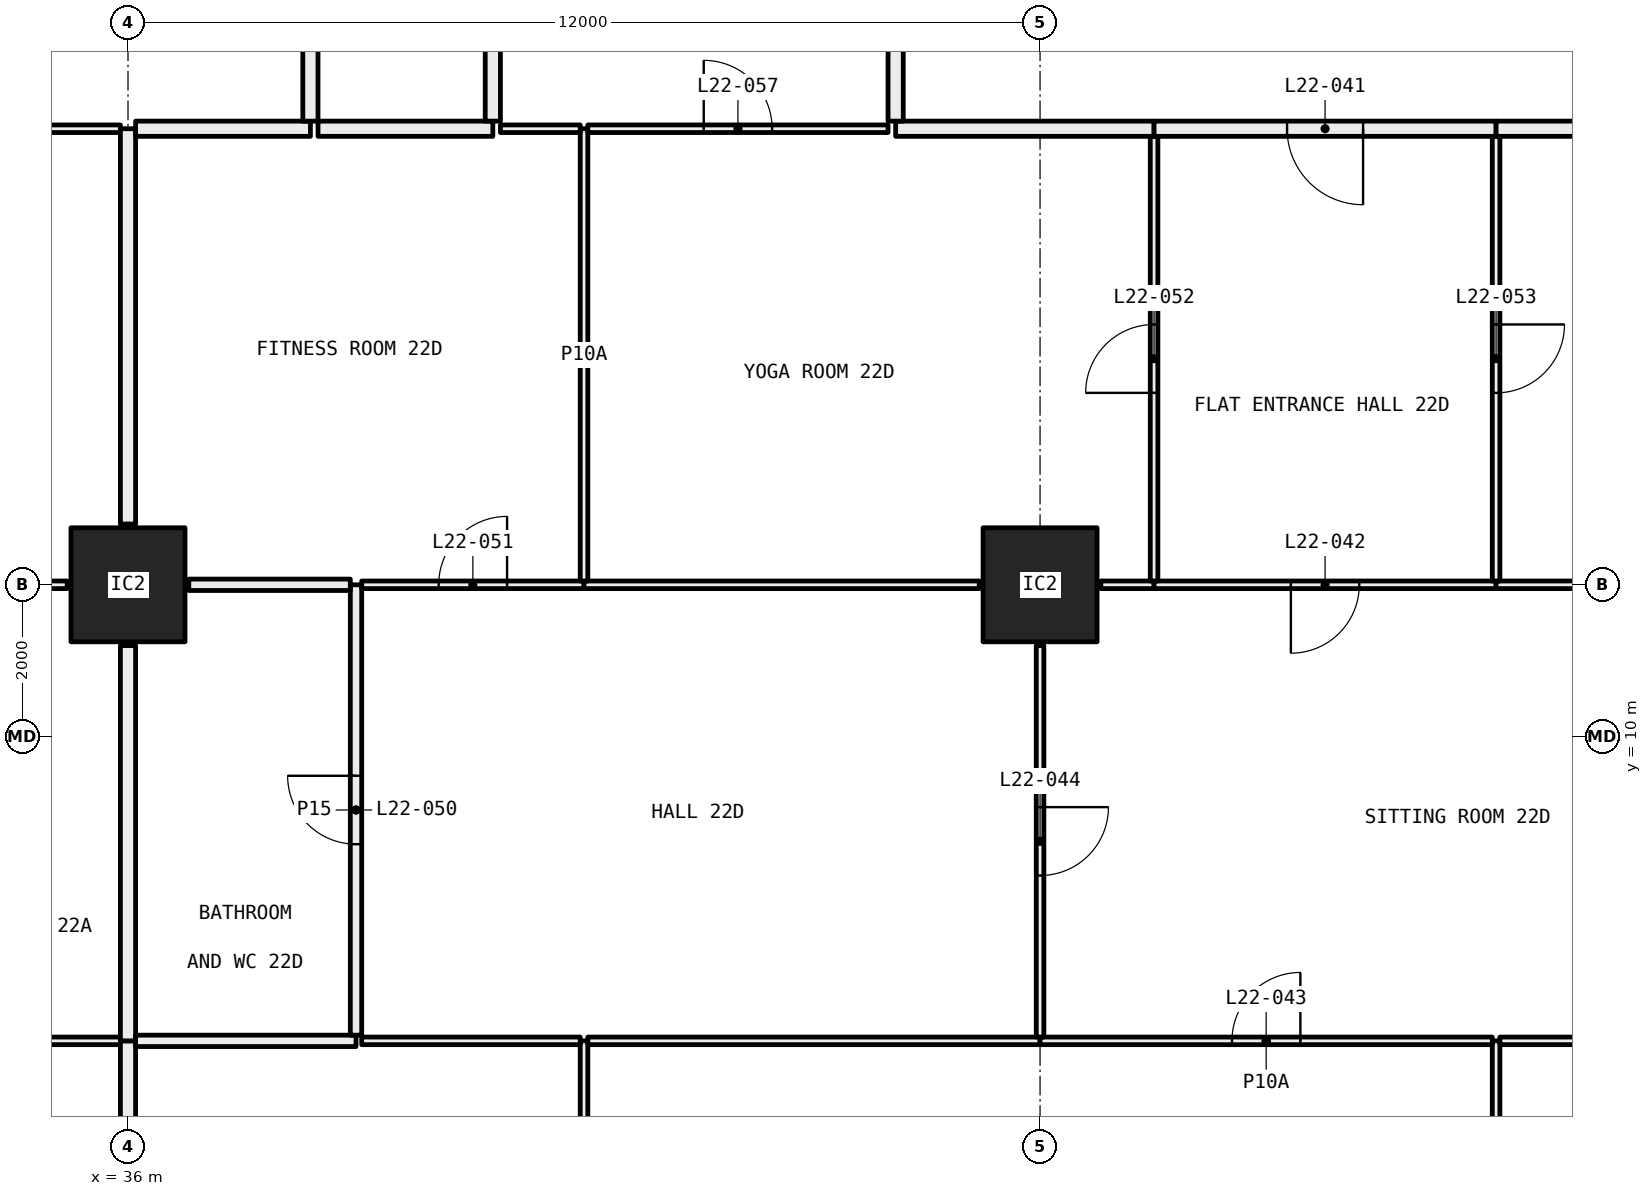
"""IFC4 building model, lengths in metres.
Left out: names, types, materials, properties, quantities, classifications, styles, units other than length and angle.
Written with IfcOpenShell. Run it as: python <this file> out.ifc"""

import sys

from ifc_helpers import new_model, si_unit, direction, frame, frame_2d, origin, origin_2d, place, context, subcontext, project, spatial, rectangle, hollow_rectangle, extrude, element, fill, save


model = new_model("IFC4")
c1 = context("Model", 3, precision=1e-05, world=origin(), true_north=direction((0.0, 1.0)))
c2 = subcontext(c1, "Body", "Model", "MODEL_VIEW")
j1 = project(units=[si_unit("LENGTHUNIT", "METRE"), si_unit("PLANEANGLEUNIT", "RADIAN")], contexts=[c1])
p1 = place(None, origin())
s1 = spatial("IfcSite", under=j1, at=p1, CompositionType="ELEMENT")
p2 = place(p1, origin())
s2 = spatial("IfcBuilding", under=s1, at=p2, CompositionType="ELEMENT")
p3 = place(p2, frame((0.0, 0.0, 88.65)))
s3 = spatial("IfcBuildingStorey", under=s2, at=p3, CompositionType="ELEMENT", Elevation=88.65)
for number, where, z_axis, x_axis in (
    (1, (36.0, 12.0, 0.0), (0.0, 0.0, 1.0), (1.0, 0.0, 0.0)),
    (2, (48.0, 12.0, 0.0), (0.0, 0.0, 1.0), (1.0, 0.0, 0.0)),
):
    element("IfcColumn", number, at=place(p3, frame(where, z_axis=z_axis, x_axis=x_axis)), inside=s3, PredefinedType="COLUMN", context=c2, shape_type="SweptSolid", body=[
        extrude(hollow_rectangle(XDim=1.5, YDim=1.5, WallThickness=0.065, at=origin_2d()), origin(), (0.0, 0.0, 1.0), 3.05),
    ])
p4 = place(p3, frame((35.9, 6.0, 0.0), z_axis=(0.0, 0.0, 1.0), x_axis=(-1.0, 0.0, 0.0)))
e3 = element("IfcWall", 3, at=p4, inside=s3, PredefinedType="PARTITIONING", context=c2, shape_type="SweptSolid", body=[
    extrude(rectangle(XDim=2.9, YDim=0.1, at=frame_2d((1.45, 0.0))), origin(), (0.0, 0.0, 1.0), 3.05),
])
p5 = place(p3, frame((36.0, 0.72, 0.0), z_axis=(0.0, 0.0, 1.0), x_axis=(0.0, 1.0, 0.0)))
e4 = element("IfcWall", 4, at=p5, inside=s3, PredefinedType="PARTITIONING", context=c2, shape_type="SweptSolid", body=[
    extrude(rectangle(XDim=5.28, YDim=0.2, at=frame_2d((2.64, 0.0))), origin(), (0.0, 0.0, 1.0), 2.45),
])
p6 = place(p3, frame((35.2, 12.0, 0.0), z_axis=(0.0, 0.0, 1.0), x_axis=(-1.0, 0.0, 0.0)))
e5 = element("IfcWall", 5, at=p6, inside=s3, PredefinedType="PARTITIONING", context=c2, shape_type="SweptSolid", body=[
    extrude(rectangle(XDim=2.15, YDim=0.1, at=frame_2d((1.075, 0.0))), origin(), (0.0, 0.0, 1.0), 2.45),
])
p7 = place(p3, frame((36.0, 6.0, 0.0), z_axis=(0.0, 0.0, 1.0), x_axis=(0.0, 1.0, 0.0)))
e6 = element("IfcWall", 6, at=p7, inside=s3, PredefinedType="PARTITIONING", context=c2, shape_type="SweptSolid", body=[
    extrude(rectangle(XDim=5.2, YDim=0.2, at=frame_2d((2.6, 0.0))), origin(), (0.0, 0.0, 1.0), 2.45),
])
p8 = place(p3, frame((35.9, 18.0, 0.0), z_axis=(0.0, 0.0, 1.0), x_axis=(-1.0, 0.0, 0.0)))
e7 = element("IfcWall", 7, at=p8, inside=s3, PredefinedType="PARTITIONING", context=c2, shape_type="SweptSolid", body=[
    extrude(rectangle(XDim=1.4, YDim=0.1, at=frame_2d((0.7, 0.0))), origin(), (0.0, 0.0, 1.0), 3.05),
])
p9 = place(p3, frame((36.0, 12.8, 0.0), z_axis=(0.0, 0.0, 1.0), x_axis=(0.0, 1.0, 0.0)))
e8 = element("IfcWall", 8, at=p9, inside=s3, PredefinedType="PARTITIONING", context=c2, shape_type="SweptSolid", body=[
    extrude(rectangle(XDim=5.2, YDim=0.2, at=frame_2d((2.6, 0.0))), origin(), (0.0, 0.0, 1.0), 2.45),
])
p10 = place(p3, frame((36.1, 18.0, 0.0), z_axis=(0.0, 0.0, 1.0), x_axis=(1.0, 0.0, 0.0)))
e9 = element("IfcWall", 9, at=p10, inside=s3, PredefinedType="PARTITIONING", context=c2, shape_type="SweptSolid", body=[
    extrude(rectangle(XDim=2.3, YDim=0.2, at=frame_2d((1.15, 0.0))), origin(), (0.0, 0.0, 1.0), 3.05),
])
p11 = place(p3, frame((38.4, 18.1, 0.0), z_axis=(0.0, 0.0, 1.0), x_axis=(0.0, 1.0, 0.0)))
e10 = element("IfcWall", 10, at=p11, inside=s3, PredefinedType="PARTITIONING", context=c2, shape_type="SweptSolid", body=[
    extrude(rectangle(XDim=6.2, YDim=0.2, at=frame_2d((3.1, 0.0))), origin(), (0.0, 0.0, 1.0), 2.45),
])
p12 = place(p3, frame((42.0, 0.72, 0.0), z_axis=(0.0, 0.0, 1.0), x_axis=(0.0, 1.0, 0.0)))
e11 = element("IfcWall", 11, at=p12, inside=s3, PredefinedType="PARTITIONING", context=c2, shape_type="SweptSolid", body=[
    extrude(rectangle(XDim=5.28, YDim=0.1, at=frame_2d((2.64, 0.0))), origin(), (0.0, 0.0, 1.0), 3.05),
])
p13 = place(p12, frame((2.19, 0.0, 0.0)))
e12 = element("IfcOpeningElement", 12, at=p13, cuts=e11, PredefinedType="OPENING", context=c2, shape_type="SweptSolid", body=[
    extrude(rectangle(XDim=0.9, YDim=2.1, at=frame_2d((0.45, 1.05))), frame((0.0, 0.06, 0.0), z_axis=(0.0, -1.0, 0.0), x_axis=(1.0, 0.0, 0.0)), (0.0, 0.0, 1.0), 0.12),
])
p14 = place(p3, frame((39.0, 6.0, 0.0), z_axis=(0.0, 0.0, 1.0), x_axis=(-1.0, 0.0, 0.0)))
e13 = element("IfcWall", 13, at=p14, inside=s3, PredefinedType="PARTITIONING", context=c2, shape_type="SweptSolid", body=[
    extrude(rectangle(XDim=2.9, YDim=0.15, at=frame_2d((1.45, 0.0))), origin(), (0.0, 0.0, 1.0), 3.05),
])
p15 = place(p3, frame((41.95, 6.0, 0.0), z_axis=(0.0, 0.0, 1.0), x_axis=(-1.0, 0.0, 0.0)))
e14 = element("IfcWall", 14, at=p15, inside=s3, PredefinedType="PARTITIONING", context=c2, shape_type="SweptSolid", body=[
    extrude(rectangle(XDim=2.875, YDim=0.1, at=frame_2d((1.438, 0.0))), origin(), (0.0, 0.0, 1.0), 3.05),
])
p16 = place(p3, frame((54.0, 0.72, 0.0), z_axis=(0.0, 0.0, 1.0), x_axis=(0.0, 1.0, 0.0)))
e15 = element("IfcWall", 15, at=p16, inside=s3, PredefinedType="PARTITIONING", context=c2, shape_type="SweptSolid", body=[
    extrude(rectangle(XDim=5.28, YDim=0.1, at=frame_2d((2.64, 0.0))), origin(), (0.0, 0.0, 1.0), 3.05),
])
p17 = place(p16, frame((2.19, 0.0, 0.0)))
e16 = element("IfcOpeningElement", 16, at=p17, cuts=e15, PredefinedType="OPENING", context=c2, shape_type="SweptSolid", body=[
    extrude(rectangle(XDim=0.9, YDim=2.1, at=frame_2d((0.45, 1.05))), frame((0.0, 0.06, 0.0), z_axis=(0.0, -1.0, 0.0), x_axis=(1.0, 0.0, 0.0)), (0.0, 0.0, 1.0), 0.12),
])
p18 = place(p3, frame((48.0, 6.0, 0.0), z_axis=(0.0, 0.0, 1.0), x_axis=(-1.0, 0.0, 0.0)))
e17 = element("IfcWall", 17, at=p18, inside=s3, PredefinedType="PARTITIONING", context=c2, shape_type="SweptSolid", body=[
    extrude(rectangle(XDim=5.95, YDim=0.1, at=frame_2d((2.975, 0.0))), origin(), (0.0, 0.0, 1.0), 2.45),
])
p19 = place(p3, frame((53.95, 6.0, 0.0), z_axis=(0.0, 0.0, 1.0), x_axis=(-1.0, 0.0, 0.0)))
e18 = element("IfcWall", 18, at=p19, inside=s3, PredefinedType="PARTITIONING", context=c2, shape_type="SweptSolid", body=[
    extrude(rectangle(XDim=5.95, YDim=0.1, at=frame_2d((2.975, 0.0))), origin(), (0.0, 0.0, 1.0), 2.45),
])
p20 = place(p19, frame((2.525, 0.0, 0.0)))
e19 = element("IfcOpeningElement", 19, at=p20, cuts=e18, PredefinedType="OPENING", context=c2, shape_type="SweptSolid", body=[
    extrude(rectangle(XDim=0.9, YDim=2.1, at=frame_2d((0.45, 1.05))), frame((0.0, 0.06, 0.0), z_axis=(0.0, -1.0, 0.0), x_axis=(1.0, 0.0, 0.0)), (0.0, 0.0, 1.0), 0.12),
])
p21 = place(p3, frame((57.0, 6.0, 0.0), z_axis=(0.0, 0.0, 1.0), x_axis=(-1.0, 0.0, 0.0)))
e20 = element("IfcWall", 20, at=p21, inside=s3, PredefinedType="PARTITIONING", context=c2, shape_type="SweptSolid", body=[
    extrude(rectangle(XDim=2.95, YDim=0.1, at=frame_2d((1.475, 0.0))), origin(), (0.0, 0.0, 1.0), 3.05),
])
p22 = place(p3, frame((39.0, 6.075, 0.0), z_axis=(0.0, 0.0, 1.0), x_axis=(0.0, 1.0, 0.0)))
e21 = element("IfcWall", 21, at=p22, inside=s3, PredefinedType="PARTITIONING", context=c2, shape_type="SweptSolid", body=[
    extrude(rectangle(XDim=5.925, YDim=0.15, at=frame_2d((2.962, 0.0))), origin(), (0.0, 0.0, 1.0), 2.45),
])
p23 = place(p22, frame((2.512, 0.0, 0.0)))
e22 = element("IfcOpeningElement", 22, at=p23, cuts=e21, PredefinedType="OPENING", context=c2, shape_type="SweptSolid", body=[
    extrude(rectangle(XDim=0.9, YDim=2.1, at=frame_2d((0.45, 1.05))), frame((0.0, 0.085, 0.0), z_axis=(0.0, -1.0, 0.0), x_axis=(1.0, 0.0, 0.0)), (0.0, 0.0, 1.0), 0.17),
])
p24 = place(p3, frame((38.925, 12.0, 0.0), z_axis=(0.0, 0.0, 1.0), x_axis=(-1.0, 0.0, 0.0)))
e23 = element("IfcWall", 23, at=p24, inside=s3, PredefinedType="PARTITIONING", context=c2, shape_type="SweptSolid", body=[
    extrude(rectangle(XDim=2.125, YDim=0.15, at=frame_2d((1.062, 0.0))), origin(), (0.0, 0.0, 1.0), 2.45),
])
p25 = place(p3, frame((48.0, 6.05, 0.0), z_axis=(0.0, 0.0, 1.0), x_axis=(0.0, 1.0, 0.0)))
e24 = element("IfcWall", 24, at=p25, inside=s3, PredefinedType="PARTITIONING", context=c2, shape_type="SweptSolid", body=[
    extrude(rectangle(XDim=5.15, YDim=0.1, at=frame_2d((2.575, 0.0))), origin(), (0.0, 0.0, 1.0), 2.45),
])
p26 = place(p25, frame((2.125, 0.0, 0.0)))
e25 = element("IfcOpeningElement", 25, at=p26, cuts=e24, PredefinedType="OPENING", context=c2, shape_type="SweptSolid", body=[
    extrude(rectangle(XDim=0.9, YDim=2.1, at=frame_2d((0.45, 1.05))), frame((0.0, 0.06, 0.0), z_axis=(0.0, -1.0, 0.0), x_axis=(1.0, 0.0, 0.0)), (0.0, 0.0, 1.0), 0.12),
])
p27 = place(p3, frame((42.0, 12.0, 0.0), z_axis=(0.0, 0.0, 1.0), x_axis=(-1.0, 0.0, 0.0)))
e26 = element("IfcWall", 26, at=p27, inside=s3, PredefinedType="PARTITIONING", context=c2, shape_type="SweptSolid", body=[
    extrude(rectangle(XDim=2.925, YDim=0.1, at=frame_2d((1.462, 0.0))), origin(), (0.0, 0.0, 1.0), 2.45),
])
p28 = place(p27, frame((1.012, 0.0, 0.0)))
e27 = element("IfcOpeningElement", 27, at=p28, cuts=e26, PredefinedType="OPENING", context=c2, shape_type="SweptSolid", body=[
    extrude(rectangle(XDim=0.9, YDim=2.1, at=frame_2d((0.45, 1.05))), frame((0.0, 0.06, 0.0), z_axis=(0.0, -1.0, 0.0), x_axis=(1.0, 0.0, 0.0)), (0.0, 0.0, 1.0), 0.12),
])
p29 = place(p3, frame((47.2, 12.0, 0.0), z_axis=(0.0, 0.0, 1.0), x_axis=(-1.0, 0.0, 0.0)))
e28 = element("IfcWall", 28, at=p29, inside=s3, PredefinedType="PARTITIONING", context=c2, shape_type="SweptSolid", body=[
    extrude(rectangle(XDim=5.2, YDim=0.1, at=frame_2d((2.6, 0.0))), origin(), (0.0, 0.0, 1.0), 2.45),
])
p30 = place(p3, frame((49.5, 12.0, 0.0), z_axis=(0.0, 0.0, 1.0), x_axis=(-1.0, 0.0, 0.0)))
e29 = element("IfcWall", 29, at=p30, inside=s3, PredefinedType="PARTITIONING", context=c2, shape_type="SweptSolid", body=[
    extrude(rectangle(XDim=0.7, YDim=0.1, at=frame_2d((0.35, 0.0))), origin(), (0.0, 0.0, 1.0), 2.45),
])
p31 = place(p3, frame((54.0, 12.0, 0.0), z_axis=(0.0, 0.0, 1.0), x_axis=(-1.0, 0.0, 0.0)))
e30 = element("IfcWall", 30, at=p31, inside=s3, PredefinedType="PARTITIONING", context=c2, shape_type="SweptSolid", body=[
    extrude(rectangle(XDim=4.5, YDim=0.1, at=frame_2d((2.25, 0.0))), origin(), (0.0, 0.0, 1.0), 2.45),
])
p32 = place(p31, frame((1.8, 0.0, 0.0)))
e31 = element("IfcOpeningElement", 31, at=p32, cuts=e30, PredefinedType="OPENING", context=c2, shape_type="SweptSolid", body=[
    extrude(rectangle(XDim=0.9, YDim=2.1, at=frame_2d((0.45, 1.05))), frame((0.0, 0.06, 0.0), z_axis=(0.0, -1.0, 0.0), x_axis=(1.0, 0.0, 0.0)), (0.0, 0.0, 1.0), 0.12),
])
p33 = place(p3, frame((56.95, 12.0, 0.0), z_axis=(0.0, 0.0, 1.0), x_axis=(-1.0, 0.0, 0.0)))
e32 = element("IfcWall", 32, at=p33, inside=s3, PredefinedType="PARTITIONING", context=c2, shape_type="SweptSolid", body=[
    extrude(rectangle(XDim=2.95, YDim=0.1, at=frame_2d((1.475, 0.0))), origin(), (0.0, 0.0, 1.0), 2.45),
])
p34 = place(p3, frame((42.0, 12.05, 0.0), z_axis=(0.0, 0.0, 1.0), x_axis=(0.0, 1.0, 0.0)))
e33 = element("IfcWall", 33, at=p34, inside=s3, PredefinedType="PARTITIONING", context=c2, shape_type="SweptSolid", body=[
    extrude(rectangle(XDim=5.95, YDim=0.1, at=frame_2d((2.975, 0.0))), origin(), (0.0, 0.0, 1.0), 2.45),
])
p35 = place(p3, frame((41.95, 18.0, 0.0), z_axis=(0.0, 0.0, 1.0), x_axis=(-1.0, 0.0, 0.0)))
e34 = element("IfcWall", 34, at=p35, inside=s3, PredefinedType="PARTITIONING", context=c2, shape_type="SweptSolid", body=[
    extrude(rectangle(XDim=1.05, YDim=0.1, at=frame_2d((0.525, 0.0))), origin(), (0.0, 0.0, 1.0), 3.05),
])
p36 = place(p3, frame((40.8, 18.0, 0.0), z_axis=(0.0, 0.0, 1.0), x_axis=(-1.0, 0.0, 0.0)))
e35 = element("IfcWall", 35, at=p36, inside=s3, PredefinedType="PARTITIONING", context=c2, shape_type="SweptSolid", body=[
    extrude(rectangle(XDim=2.3, YDim=0.2, at=frame_2d((1.15, 0.0))), origin(), (0.0, 0.0, 1.0), 3.05),
])
p37 = place(p3, frame((49.5, 12.05, 0.0), z_axis=(0.0, 0.0, 1.0), x_axis=(0.0, 1.0, 0.0)))
e36 = element("IfcWall", 36, at=p37, inside=s3, PredefinedType="PARTITIONING", context=c2, shape_type="SweptSolid", body=[
    extrude(rectangle(XDim=5.85, YDim=0.1, at=frame_2d((2.925, 0.0))), origin(), (0.0, 0.0, 1.0), 2.45),
])
p38 = place(p37, frame((2.475, 0.0, 0.0)))
e37 = element("IfcOpeningElement", 37, at=p38, cuts=e36, PredefinedType="OPENING", context=c2, shape_type="SweptSolid", body=[
    extrude(rectangle(XDim=0.9, YDim=2.1, at=frame_2d((0.45, 1.05))), frame((0.0, 0.06, 0.0), z_axis=(0.0, -1.0, 0.0), x_axis=(1.0, 0.0, 0.0)), (0.0, 0.0, 1.0), 0.12),
])
p39 = place(p3, frame((46.0, 18.0, 0.0), z_axis=(0.0, 0.0, 1.0), x_axis=(-1.0, 0.0, 0.0)))
e38 = element("IfcWall", 38, at=p39, inside=s3, PredefinedType="PARTITIONING", context=c2, shape_type="SweptSolid", body=[
    extrude(rectangle(XDim=3.95, YDim=0.1, at=frame_2d((1.975, 0.0))), origin(), (0.0, 0.0, 1.0), 3.05),
])
p40 = place(p39, frame((1.525, 0.0, 0.0)))
e39 = element("IfcOpeningElement", 39, at=p40, cuts=e38, PredefinedType="OPENING", context=c2, shape_type="SweptSolid", body=[
    extrude(rectangle(XDim=0.9, YDim=2.1, at=frame_2d((0.45, 1.05))), frame((0.0, 0.06, 0.0), z_axis=(0.0, -1.0, 0.0), x_axis=(1.0, 0.0, 0.0)), (0.0, 0.0, 1.0), 0.12),
])
p41 = place(p3, frame((49.5, 18.0, 0.0), z_axis=(0.0, 0.0, 1.0), x_axis=(-1.0, 0.0, 0.0)))
e40 = element("IfcWall", 40, at=p41, inside=s3, PredefinedType="PARTITIONING", context=c2, shape_type="SweptSolid", body=[
    extrude(rectangle(XDim=3.4, YDim=0.2, at=frame_2d((1.7, 0.0))), origin(), (0.0, 0.0, 1.0), 3.05),
])
p42 = place(p3, frame((54.0, 12.05, 0.0), z_axis=(0.0, 0.0, 1.0), x_axis=(0.0, 1.0, 0.0)))
e41 = element("IfcWall", 41, at=p42, inside=s3, PredefinedType="PARTITIONING", context=c2, shape_type="SweptSolid", body=[
    extrude(rectangle(XDim=5.85, YDim=0.1, at=frame_2d((2.925, 0.0))), origin(), (0.0, 0.0, 1.0), 2.45),
])
p43 = place(p42, frame((2.475, 0.0, 0.0)))
e42 = element("IfcOpeningElement", 42, at=p43, cuts=e41, PredefinedType="OPENING", context=c2, shape_type="SweptSolid", body=[
    extrude(rectangle(XDim=0.9, YDim=2.1, at=frame_2d((0.45, 1.05))), frame((0.0, 0.06, 0.0), z_axis=(0.0, -1.0, 0.0), x_axis=(1.0, 0.0, 0.0)), (0.0, 0.0, 1.0), 0.12),
])
p44 = place(p3, frame((54.0, 18.0, 0.0), z_axis=(0.0, 0.0, 1.0), x_axis=(-1.0, 0.0, 0.0)))
e43 = element("IfcWall", 43, at=p44, inside=s3, PredefinedType="PARTITIONING", context=c2, shape_type="SweptSolid", body=[
    extrude(rectangle(XDim=4.5, YDim=0.2, at=frame_2d((2.25, 0.0))), origin(), (0.0, 0.0, 1.0), 3.05),
])
p45 = place(p44, frame((1.75, 0.0, 0.0)))
e44 = element("IfcOpeningElement", 44, at=p45, cuts=e43, PredefinedType="OPENING", context=c2, shape_type="SweptSolid", body=[
    extrude(rectangle(XDim=1.0, YDim=2.1, at=frame_2d((0.5, 1.05))), frame((0.0, 0.11, 0.0), z_axis=(0.0, -1.0, 0.0), x_axis=(1.0, 0.0, 0.0)), (0.0, 0.0, 1.0), 0.22),
])
p46 = place(p3, frame((61.9, 18.0, 0.0), z_axis=(0.0, 0.0, 1.0), x_axis=(-1.0, 0.0, 0.0)))
e45 = element("IfcWall", 45, at=p46, inside=s3, PredefinedType="PARTITIONING", context=c2, shape_type="SweptSolid", body=[
    extrude(rectangle(XDim=7.9, YDim=0.2, at=frame_2d((3.95, 0.0))), origin(), (0.0, 0.0, 1.0), 3.05),
])
p47 = place(p3, frame((40.8, 23.9, 0.0), z_axis=(0.0, 0.0, 1.0), x_axis=(0.0, -1.0, 0.0)))
e46 = element("IfcWall", 46, at=p47, inside=s3, PredefinedType="PARTITIONING", context=c2, shape_type="SweptSolid", body=[
    extrude(rectangle(XDim=5.8, YDim=0.2, at=frame_2d((2.9, 0.0))), origin(), (0.0, 0.0, 1.0), 3.05),
])
p48 = place(p3, frame((46.1, 18.1, 0.0), z_axis=(0.0, 0.0, 1.0), x_axis=(0.0, 1.0, 0.0)))
e47 = element("IfcWall", 47, at=p48, inside=s3, PredefinedType="PARTITIONING", context=c2, shape_type="SweptSolid", body=[
    extrude(rectangle(XDim=6.2, YDim=0.2, at=frame_2d((3.1, 0.0))), origin(), (0.0, 0.0, 1.0), 2.45),
])
p49 = place(p45, origin())
e48 = element("IfcDoor", 48, at=p49, inside=s3, OperationType="SINGLE_SWING_RIGHT", PredefinedType="DOOR", context=c2, shape_type="SweptSolid", body=[
    extrude(rectangle(XDim=1.0, YDim=2.1, at=frame_2d((0.5, 1.05))), frame((0.0, 0.025, 0.0), z_axis=(0.0, -1.0, 0.0), x_axis=(1.0, 0.0, 0.0)), (0.0, 0.0, 1.0), 0.05),
])
fill(e44, e48)
p50 = place(p32, origin())
e49 = element("IfcDoor", 49, at=p50, inside=s3, OperationType="SINGLE_SWING_LEFT", PredefinedType="DOOR", context=c2, shape_type="SweptSolid", body=[
    extrude(rectangle(XDim=0.9, YDim=2.1, at=frame_2d((0.45, 1.05))), frame((0.0, 0.025, 0.0), z_axis=(0.0, -1.0, 0.0), x_axis=(1.0, 0.0, 0.0)), (0.0, 0.0, 1.0), 0.05),
])
fill(e31, e49)
p51 = place(p20, frame((0.9, 0.0, 0.0), x_axis=(-1.0, 0.0, 0.0)))
e50 = element("IfcDoor", 50, at=p51, inside=s3, OperationType="SINGLE_SWING_LEFT", PredefinedType="DOOR", context=c2, shape_type="SweptSolid", body=[
    extrude(rectangle(XDim=0.9, YDim=2.1, at=frame_2d((0.45, 1.05))), frame((0.0, 0.025, 0.0), z_axis=(0.0, -1.0, 0.0), x_axis=(1.0, 0.0, 0.0)), (0.0, 0.0, 1.0), 0.05),
])
fill(e19, e50)
p52 = place(p26, frame((0.9, 0.0, 0.0), x_axis=(-1.0, 0.0, 0.0)))
e51 = element("IfcDoor", 51, at=p52, inside=s3, OperationType="SINGLE_SWING_RIGHT", PredefinedType="DOOR", context=c2, shape_type="SweptSolid", body=[
    extrude(rectangle(XDim=0.9, YDim=2.1, at=frame_2d((0.45, 1.05))), frame((0.0, 0.025, 0.0), z_axis=(0.0, -1.0, 0.0), x_axis=(1.0, 0.0, 0.0)), (0.0, 0.0, 1.0), 0.05),
])
fill(e25, e51)
p53 = place(p23, origin())
e52 = element("IfcDoor", 52, at=p53, inside=s3, OperationType="SINGLE_SWING_LEFT", PredefinedType="DOOR", context=c2, shape_type="SweptSolid", body=[
    extrude(rectangle(XDim=0.9, YDim=2.1, at=frame_2d((0.45, 1.05))), frame((0.0, 0.025, 0.0), z_axis=(0.0, -1.0, 0.0), x_axis=(1.0, 0.0, 0.0)), (0.0, 0.0, 1.0), 0.05),
])
fill(e22, e52)
p54 = place(p28, frame((0.9, 0.0, 0.0), x_axis=(-1.0, 0.0, 0.0)))
e53 = element("IfcDoor", 53, at=p54, inside=s3, OperationType="SINGLE_SWING_LEFT", PredefinedType="DOOR", context=c2, shape_type="SweptSolid", body=[
    extrude(rectangle(XDim=0.9, YDim=2.1, at=frame_2d((0.45, 1.05))), frame((0.0, 0.025, 0.0), z_axis=(0.0, -1.0, 0.0), x_axis=(1.0, 0.0, 0.0)), (0.0, 0.0, 1.0), 0.05),
])
fill(e27, e53)
p55 = place(p38, origin())
e54 = element("IfcDoor", 54, at=p55, inside=s3, OperationType="SINGLE_SWING_RIGHT", PredefinedType="DOOR", context=c2, shape_type="SweptSolid", body=[
    extrude(rectangle(XDim=0.9, YDim=2.1, at=frame_2d((0.45, 1.05))), frame((0.0, 0.025, 0.0), z_axis=(0.0, -1.0, 0.0), x_axis=(1.0, 0.0, 0.0)), (0.0, 0.0, 1.0), 0.05),
])
fill(e37, e54)
p56 = place(p43, frame((0.9, 0.0, 0.0), x_axis=(-1.0, 0.0, 0.0)))
e55 = element("IfcDoor", 55, at=p56, inside=s3, OperationType="SINGLE_SWING_RIGHT", PredefinedType="DOOR", context=c2, shape_type="SweptSolid", body=[
    extrude(rectangle(XDim=0.9, YDim=2.1, at=frame_2d((0.45, 1.05))), frame((0.0, 0.025, 0.0), z_axis=(0.0, -1.0, 0.0), x_axis=(1.0, 0.0, 0.0)), (0.0, 0.0, 1.0), 0.05),
])
fill(e42, e55)
p57 = place(p40, frame((0.9, 0.0, 0.0), x_axis=(-1.0, 0.0, 0.0)))
e56 = element("IfcDoor", 56, at=p57, inside=s3, OperationType="SINGLE_SWING_RIGHT", PredefinedType="DOOR", context=c2, shape_type="SweptSolid", body=[
    extrude(rectangle(XDim=0.9, YDim=2.1, at=frame_2d((0.45, 1.05))), frame((0.0, 0.025, 0.0), z_axis=(0.0, -1.0, 0.0), x_axis=(1.0, 0.0, 0.0)), (0.0, 0.0, 1.0), 0.05),
])
fill(e39, e56)
save(model, sys.argv[1])
